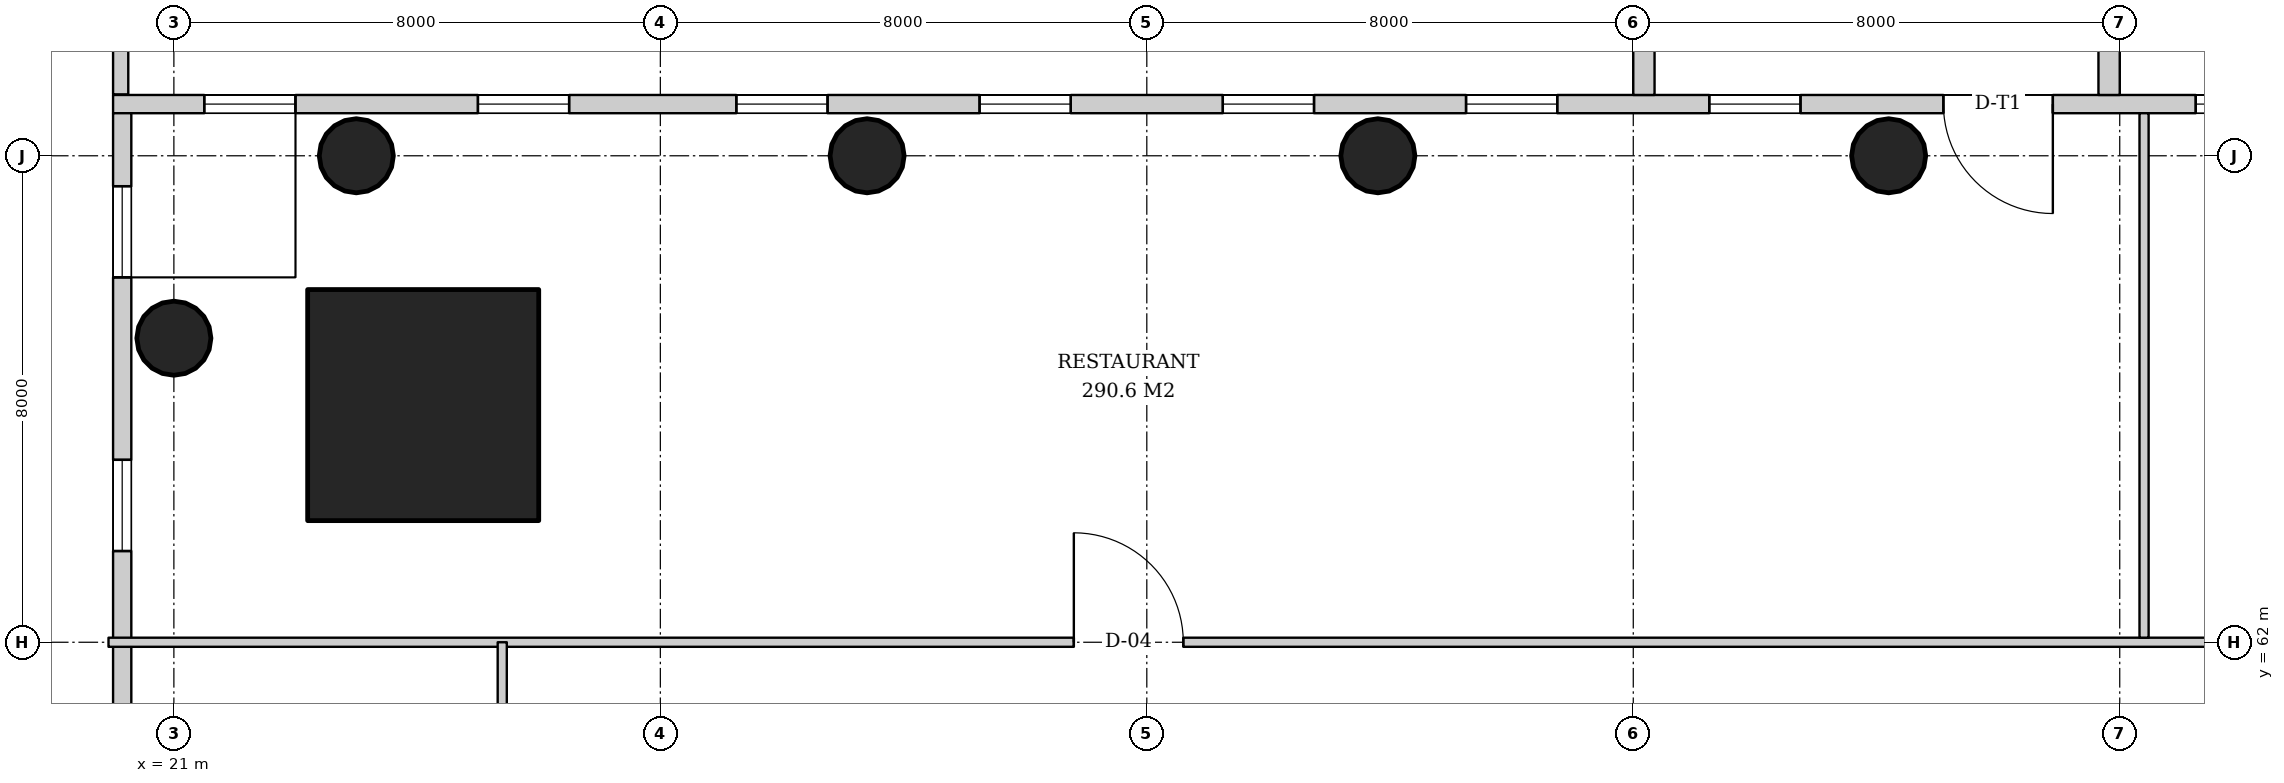
"""IFC4 building model, lengths in metres.
Left out: names, types, materials, properties, quantities, classifications, styles, units other than length and angle.
Written with IfcOpenShell. Run it as: python <this file> out.ifc"""

import sys

from ifc_helpers import new_model, si_unit, direction, frame, frame_2d, origin, origin_2d, place, context, subcontext, project, spatial, rectangle, hollow_circle, extrude, element, fill, save


model = new_model("IFC4")
c1 = context("Model", 3, precision=1e-05, world=origin(), true_north=direction((0.0, 1.0)))
c2 = subcontext(c1, "Body", "Model", "MODEL_VIEW")
j1 = project(units=[si_unit("LENGTHUNIT", "METRE"), si_unit("PLANEANGLEUNIT", "RADIAN")], contexts=[c1])
p1 = place(None, origin())
s1 = spatial("IfcSite", under=j1, at=p1, CompositionType="ELEMENT")
p2 = place(p1, origin())
s2 = spatial("IfcBuilding", under=s1, at=p2, CompositionType="ELEMENT")
p3 = place(p2, frame((0.0, 0.0, 16.0)))
s3 = spatial("IfcBuildingStorey", under=s2, at=p3, CompositionType="ELEMENT", Elevation=16.0)
p4 = place(p3, frame((25.1, 65.9, 0.0), z_axis=(0.0, 0.0, 1.0), x_axis=(1.0, 0.0, 0.0)))
e1 = element("IfcColumn", 1, at=p4, inside=s3, PredefinedType="COLUMN", context=c2, shape_type="SweptSolid", body=[
    extrude(rectangle(XDim=3.8, YDim=3.8, at=origin_2d()), origin(), (0.0, 0.0, 1.0), 5.0),
])
for number, where, z_axis, x_axis in (
    (2, (24.0, 70.0, 0.0), (0.0, 0.0, 1.0), (1.0, 0.0, 0.0)),
    (3, (49.2, 70.0, 0.0), (0.0, 0.0, 1.0), (1.0, 0.0, 0.0)),
    (4, (40.8, 70.0, 0.0), (0.0, 0.0, 1.0), (1.0, 0.0, 0.0)),
    (5, (32.4, 70.0, 0.0), (0.0, 0.0, 1.0), (1.0, 0.0, 0.0)),
    (6, (21.0, 67.0, 0.0), (0.0, 0.0, 1.0), (1.0, 0.0, 0.0)),
):
    element("IfcColumn", number, at=place(p3, frame(where, z_axis=z_axis, x_axis=x_axis)), inside=s3, PredefinedType="COLUMN", context=c2, shape_type="SweptSolid", body=[
        extrude(hollow_circle(Radius=0.61, WallThickness=0.04, at=origin_2d()), origin(), (0.0, 0.0, 1.0), 5.0),
    ])
p5 = place(p3, frame((78.0, 70.85, 0.0), z_axis=(0.0, 0.0, 1.0), x_axis=(-1.0, 0.0, 0.0)))
e7 = element("IfcWall", 7, at=p5, inside=s3, PredefinedType="SOLIDWALL", context=c2, shape_type="SweptSolid", body=[
    extrude(rectangle(XDim=58.0, YDim=0.3, at=frame_2d((29.0, 0.0))), origin(), (0.0, 0.0, 1.0), 4.7),
])
p6 = place(p5, frame((1.5, 0.0, 0.9)))
e8 = element("IfcOpeningElement", 8, at=p6, cuts=e7, PredefinedType="OPENING", context=c2, shape_type="SweptSolid", body=[
    extrude(rectangle(XDim=1.5, YDim=3.2, at=frame_2d((0.75, 1.6))), frame((0.0, 0.16, 0.0), z_axis=(0.0, -1.0, 0.0), x_axis=(1.0, 0.0, 0.0)), (0.0, 0.0, 1.0), 0.32),
])
p7 = place(p5, frame((6.0, 0.0, 0.9)))
e9 = element("IfcOpeningElement", 9, at=p7, cuts=e7, PredefinedType="OPENING", context=c2, shape_type="SweptSolid", body=[
    extrude(rectangle(XDim=1.5, YDim=3.2, at=frame_2d((0.75, 1.6))), frame((0.0, 0.16, 0.0), z_axis=(0.0, -1.0, 0.0), x_axis=(1.0, 0.0, 0.0)), (0.0, 0.0, 1.0), 0.32),
])
p8 = place(p5, frame((10.25, 0.0, 0.9)))
e10 = element("IfcOpeningElement", 10, at=p8, cuts=e7, PredefinedType="OPENING", context=c2, shape_type="SweptSolid", body=[
    extrude(rectangle(XDim=1.5, YDim=3.2, at=frame_2d((0.75, 1.6))), frame((0.0, 0.16, 0.0), z_axis=(0.0, -1.0, 0.0), x_axis=(1.0, 0.0, 0.0)), (0.0, 0.0, 1.0), 0.32),
])
p9 = place(p5, frame((14.25, 0.0, 0.9)))
e11 = element("IfcOpeningElement", 11, at=p9, cuts=e7, PredefinedType="OPENING", context=c2, shape_type="SweptSolid", body=[
    extrude(rectangle(XDim=1.5, YDim=3.2, at=frame_2d((0.75, 1.6))), frame((0.0, 0.16, 0.0), z_axis=(0.0, -1.0, 0.0), x_axis=(1.0, 0.0, 0.0)), (0.0, 0.0, 1.0), 0.32),
])
p10 = place(p5, frame((18.25, 0.0, 0.9)))
e12 = element("IfcOpeningElement", 12, at=p10, cuts=e7, PredefinedType="OPENING", context=c2, shape_type="SweptSolid", body=[
    extrude(rectangle(XDim=1.5, YDim=3.2, at=frame_2d((0.75, 1.6))), frame((0.0, 0.16, 0.0), z_axis=(0.0, -1.0, 0.0), x_axis=(1.0, 0.0, 0.0)), (0.0, 0.0, 1.0), 0.32),
])
p11 = place(p5, frame((22.25, 0.0, 0.9)))
e13 = element("IfcOpeningElement", 13, at=p11, cuts=e7, PredefinedType="OPENING", context=c2, shape_type="SweptSolid", body=[
    extrude(rectangle(XDim=1.5, YDim=3.2, at=frame_2d((0.75, 1.6))), frame((0.0, 0.16, 0.0), z_axis=(0.0, -1.0, 0.0), x_axis=(1.0, 0.0, 0.0)), (0.0, 0.0, 1.0), 0.32),
])
p12 = place(p5, frame((26.1, 0.0, 0.0)))
e14 = element("IfcOpeningElement", 14, at=p12, cuts=e7, PredefinedType="OPENING", context=c2, shape_type="SweptSolid", body=[
    extrude(rectangle(XDim=1.8, YDim=2.4, at=frame_2d((0.9, 1.2))), frame((0.0, 0.16, 0.0), z_axis=(0.0, -1.0, 0.0), x_axis=(1.0, 0.0, 0.0)), (0.0, 0.0, 1.0), 0.32),
])
p13 = place(p5, frame((30.25, 0.0, 0.9)))
e15 = element("IfcOpeningElement", 15, at=p13, cuts=e7, PredefinedType="OPENING", context=c2, shape_type="SweptSolid", body=[
    extrude(rectangle(XDim=1.5, YDim=3.2, at=frame_2d((0.75, 1.6))), frame((0.0, 0.16, 0.0), z_axis=(0.0, -1.0, 0.0), x_axis=(1.0, 0.0, 0.0)), (0.0, 0.0, 1.0), 0.32),
])
p14 = place(p5, frame((34.25, 0.0, 0.9)))
e16 = element("IfcOpeningElement", 16, at=p14, cuts=e7, PredefinedType="OPENING", context=c2, shape_type="SweptSolid", body=[
    extrude(rectangle(XDim=1.5, YDim=3.2, at=frame_2d((0.75, 1.6))), frame((0.0, 0.16, 0.0), z_axis=(0.0, -1.0, 0.0), x_axis=(1.0, 0.0, 0.0)), (0.0, 0.0, 1.0), 0.32),
])
p15 = place(p5, frame((38.25, 0.0, 0.9)))
e17 = element("IfcOpeningElement", 17, at=p15, cuts=e7, PredefinedType="OPENING", context=c2, shape_type="SweptSolid", body=[
    extrude(rectangle(XDim=1.5, YDim=3.2, at=frame_2d((0.75, 1.6))), frame((0.0, 0.16, 0.0), z_axis=(0.0, -1.0, 0.0), x_axis=(1.0, 0.0, 0.0)), (0.0, 0.0, 1.0), 0.32),
])
p16 = place(p5, frame((42.25, 0.0, 0.9)))
e18 = element("IfcOpeningElement", 18, at=p16, cuts=e7, PredefinedType="OPENING", context=c2, shape_type="SweptSolid", body=[
    extrude(rectangle(XDim=1.5, YDim=3.2, at=frame_2d((0.75, 1.6))), frame((0.0, 0.16, 0.0), z_axis=(0.0, -1.0, 0.0), x_axis=(1.0, 0.0, 0.0)), (0.0, 0.0, 1.0), 0.32),
])
p17 = place(p5, frame((46.25, 0.0, 0.9)))
e19 = element("IfcOpeningElement", 19, at=p17, cuts=e7, PredefinedType="OPENING", context=c2, shape_type="SweptSolid", body=[
    extrude(rectangle(XDim=1.5, YDim=3.2, at=frame_2d((0.75, 1.6))), frame((0.0, 0.16, 0.0), z_axis=(0.0, -1.0, 0.0), x_axis=(1.0, 0.0, 0.0)), (0.0, 0.0, 1.0), 0.32),
])
p18 = place(p5, frame((50.5, 0.0, 0.9)))
e20 = element("IfcOpeningElement", 20, at=p18, cuts=e7, PredefinedType="OPENING", context=c2, shape_type="SweptSolid", body=[
    extrude(rectangle(XDim=1.5, YDim=3.2, at=frame_2d((0.75, 1.6))), frame((0.0, 0.16, 0.0), z_axis=(0.0, -1.0, 0.0), x_axis=(1.0, 0.0, 0.0)), (0.0, 0.0, 1.0), 0.32),
])
p19 = place(p5, frame((55.0, 0.0, 0.9)))
e21 = element("IfcOpeningElement", 21, at=p19, cuts=e7, PredefinedType="OPENING", context=c2, shape_type="SweptSolid", body=[
    extrude(rectangle(XDim=1.5, YDim=3.2, at=frame_2d((0.75, 1.6))), frame((0.0, 0.16, 0.0), z_axis=(0.0, -1.0, 0.0), x_axis=(1.0, 0.0, 0.0)), (0.0, 0.0, 1.0), 0.32),
])
p20 = place(p3, frame((20.15, 70.7, 0.0), z_axis=(0.0, 0.0, 1.0), x_axis=(0.0, -1.0, 0.0)))
e22 = element("IfcWall", 22, at=p20, inside=s3, PredefinedType="SOLIDWALL", context=c2, shape_type="SweptSolid", body=[
    extrude(rectangle(XDim=49.4, YDim=0.3, at=frame_2d((24.7, 0.0))), origin(), (0.0, 0.0, 1.0), 4.7),
])
p21 = place(p20, frame((1.2, 0.0, 0.9)))
e23 = element("IfcOpeningElement", 23, at=p21, cuts=e22, PredefinedType="OPENING", context=c2, shape_type="SweptSolid", body=[
    extrude(rectangle(XDim=1.5, YDim=3.2, at=frame_2d((0.75, 1.6))), frame((0.0, 0.16, 0.0), z_axis=(0.0, -1.0, 0.0), x_axis=(1.0, 0.0, 0.0)), (0.0, 0.0, 1.0), 0.32),
])
p22 = place(p20, frame((5.7, 0.0, 0.9)))
e24 = element("IfcOpeningElement", 24, at=p22, cuts=e22, PredefinedType="OPENING", context=c2, shape_type="SweptSolid", body=[
    extrude(rectangle(XDim=1.5, YDim=3.2, at=frame_2d((0.75, 1.6))), frame((0.0, 0.16, 0.0), z_axis=(0.0, -1.0, 0.0), x_axis=(1.0, 0.0, 0.0)), (0.0, 0.0, 1.0), 0.32),
])
p23 = place(p20, frame((9.95, 0.0, 0.9)))
e25 = element("IfcOpeningElement", 25, at=p23, cuts=e22, PredefinedType="OPENING", context=c2, shape_type="SweptSolid", body=[
    extrude(rectangle(XDim=1.5, YDim=3.2, at=frame_2d((0.75, 1.6))), frame((0.0, 0.16, 0.0), z_axis=(0.0, -1.0, 0.0), x_axis=(1.0, 0.0, 0.0)), (0.0, 0.0, 1.0), 0.32),
])
p24 = place(p20, frame((13.95, 0.0, 0.9)))
e26 = element("IfcOpeningElement", 26, at=p24, cuts=e22, PredefinedType="OPENING", context=c2, shape_type="SweptSolid", body=[
    extrude(rectangle(XDim=1.5, YDim=3.2, at=frame_2d((0.75, 1.6))), frame((0.0, 0.16, 0.0), z_axis=(0.0, -1.0, 0.0), x_axis=(1.0, 0.0, 0.0)), (0.0, 0.0, 1.0), 0.32),
])
p25 = place(p20, frame((17.95, 0.0, 0.9)))
e27 = element("IfcOpeningElement", 27, at=p25, cuts=e22, PredefinedType="OPENING", context=c2, shape_type="SweptSolid", body=[
    extrude(rectangle(XDim=1.5, YDim=3.2, at=frame_2d((0.75, 1.6))), frame((0.0, 0.16, 0.0), z_axis=(0.0, -1.0, 0.0), x_axis=(1.0, 0.0, 0.0)), (0.0, 0.0, 1.0), 0.32),
])
p26 = place(p20, frame((21.95, 0.0, 0.9)))
e28 = element("IfcOpeningElement", 28, at=p26, cuts=e22, PredefinedType="OPENING", context=c2, shape_type="SweptSolid", body=[
    extrude(rectangle(XDim=1.5, YDim=3.2, at=frame_2d((0.75, 1.6))), frame((0.0, 0.16, 0.0), z_axis=(0.0, -1.0, 0.0), x_axis=(1.0, 0.0, 0.0)), (0.0, 0.0, 1.0), 0.32),
])
p27 = place(p20, frame((25.95, 0.0, 0.9)))
e29 = element("IfcOpeningElement", 29, at=p27, cuts=e22, PredefinedType="OPENING", context=c2, shape_type="SweptSolid", body=[
    extrude(rectangle(XDim=1.5, YDim=3.2, at=frame_2d((0.75, 1.6))), frame((0.0, 0.16, 0.0), z_axis=(0.0, -1.0, 0.0), x_axis=(1.0, 0.0, 0.0)), (0.0, 0.0, 1.0), 0.32),
])
p28 = place(p20, frame((29.95, 0.0, 0.9)))
e30 = element("IfcOpeningElement", 30, at=p28, cuts=e22, PredefinedType="OPENING", context=c2, shape_type="SweptSolid", body=[
    extrude(rectangle(XDim=1.5, YDim=3.2, at=frame_2d((0.75, 1.6))), frame((0.0, 0.16, 0.0), z_axis=(0.0, -1.0, 0.0), x_axis=(1.0, 0.0, 0.0)), (0.0, 0.0, 1.0), 0.32),
])
p29 = place(p20, frame((33.95, 0.0, 0.9)))
e31 = element("IfcOpeningElement", 31, at=p29, cuts=e22, PredefinedType="OPENING", context=c2, shape_type="SweptSolid", body=[
    extrude(rectangle(XDim=1.5, YDim=3.2, at=frame_2d((0.75, 1.6))), frame((0.0, 0.16, 0.0), z_axis=(0.0, -1.0, 0.0), x_axis=(1.0, 0.0, 0.0)), (0.0, 0.0, 1.0), 0.32),
])
p30 = place(p20, frame((37.95, 0.0, 0.9)))
e32 = element("IfcOpeningElement", 32, at=p30, cuts=e22, PredefinedType="OPENING", context=c2, shape_type="SweptSolid", body=[
    extrude(rectangle(XDim=1.5, YDim=3.2, at=frame_2d((0.75, 1.6))), frame((0.0, 0.16, 0.0), z_axis=(0.0, -1.0, 0.0), x_axis=(1.0, 0.0, 0.0)), (0.0, 0.0, 1.0), 0.32),
])
p31 = place(p20, frame((42.2, 0.0, 0.9)))
e33 = element("IfcOpeningElement", 33, at=p31, cuts=e22, PredefinedType="OPENING", context=c2, shape_type="SweptSolid", body=[
    extrude(rectangle(XDim=1.5, YDim=3.2, at=frame_2d((0.75, 1.6))), frame((0.0, 0.16, 0.0), z_axis=(0.0, -1.0, 0.0), x_axis=(1.0, 0.0, 0.0)), (0.0, 0.0, 1.0), 0.32),
])
p32 = place(p20, frame((46.7, 0.0, 0.9)))
e34 = element("IfcOpeningElement", 34, at=p32, cuts=e22, PredefinedType="OPENING", context=c2, shape_type="SweptSolid", body=[
    extrude(rectangle(XDim=1.5, YDim=3.2, at=frame_2d((0.75, 1.6))), frame((0.0, 0.16, 0.0), z_axis=(0.0, -1.0, 0.0), x_axis=(1.0, 0.0, 0.0)), (0.0, 0.0, 1.0), 0.32),
])
p33 = place(p3, frame((20.125, 71.01, 0.0), z_axis=(0.0, 0.0, 1.0), x_axis=(0.0, 1.0, 0.0)))
e35 = element("IfcWall", 35, at=p33, inside=s3, PredefinedType="PARAPET", context=c2, shape_type="SweptSolid", body=[
    extrude(rectangle(XDim=7.74, YDim=0.25, at=frame_2d((3.87, 0.0))), origin(), (0.0, 0.0, 1.0), 1.1),
])
for number, where, z_axis, x_axis in (
    (36, (45.175, 71.0, 0.0), (0.0, 0.0, 1.0), (0.0, 1.0, 0.0)),
    (37, (52.825, 71.0, 0.0), (0.0, 0.0, 1.0), (0.0, 1.0, 0.0)),
):
    element("IfcWall", number, at=place(p3, frame(where, z_axis=z_axis, x_axis=x_axis)), inside=s3, PredefinedType="PARAPET", context=c2, shape_type="SweptSolid", body=[
        extrude(rectangle(XDim=8.0, YDim=0.35, at=frame_2d((4.0, 0.0))), origin(), (0.0, 0.0, 1.0), 1.1),
    ])
p34 = place(p3, frame((19.925, 62.0, 0.0), z_axis=(0.0, 0.0, 1.0), x_axis=(1.0, 0.0, 0.0)))
e38 = element("IfcWall", 38, at=p34, inside=s3, PredefinedType="PARTITIONING", context=c2, shape_type="SweptSolid", body=[
    extrude(rectangle(XDim=50.15, YDim=0.15, at=frame_2d((25.075, 0.0))), origin(), (0.0, 0.0, 1.0), 3.688),
])
p35 = place(p34, frame((15.875, 0.0, 0.0)))
e39 = element("IfcOpeningElement", 39, at=p35, cuts=e38, PredefinedType="OPENING", context=c2, shape_type="SweptSolid", body=[
    extrude(rectangle(XDim=1.8, YDim=2.4, at=frame_2d((0.9, 1.2))), frame((0.0, 0.085, 0.0), z_axis=(0.0, -1.0, 0.0), x_axis=(1.0, 0.0, 0.0)), (0.0, 0.0, 1.0), 0.17),
])
p36 = place(p34, frame((39.875, 0.0, 0.0)))
e40 = element("IfcOpeningElement", 40, at=p36, cuts=e38, PredefinedType="OPENING", context=c2, shape_type="SweptSolid", body=[
    extrude(rectangle(XDim=1.0, YDim=2.1, at=frame_2d((0.5, 1.05))), frame((0.0, 0.085, 0.0), z_axis=(0.0, -1.0, 0.0), x_axis=(1.0, 0.0, 0.0)), (0.0, 0.0, 1.0), 0.17),
])
p37 = place(p3, frame((53.4, 62.075, 0.0), z_axis=(0.0, 0.0, 1.0), x_axis=(0.0, 1.0, 0.0)))
e41 = element("IfcWall", 41, at=p37, inside=s3, PredefinedType="PARTITIONING", context=c2, shape_type="SweptSolid", body=[
    extrude(rectangle(XDim=8.625, YDim=0.15, at=frame_2d((4.312, 0.0))), origin(), (0.0, 0.0, 1.0), 4.1),
])
p38 = place(p3, frame((26.4, 30.0, 0.0), z_axis=(0.0, 0.0, 1.0), x_axis=(0.0, 1.0, 0.0)))
e42 = element("IfcWall", 42, at=p38, inside=s3, PredefinedType="PARTITIONING", context=c2, shape_type="SweptSolid", body=[
    extrude(rectangle(XDim=32.0, YDim=0.15, at=frame_2d((16.0, 0.0))), origin(), (0.0, 0.0, 1.0), 3.688),
])
p39 = place(p38, frame((7.5, 0.0, 0.0)))
e43 = element("IfcOpeningElement", 43, at=p39, cuts=e42, PredefinedType="OPENING", context=c2, shape_type="SweptSolid", body=[
    extrude(rectangle(XDim=1.0, YDim=2.1, at=frame_2d((0.5, 1.05))), frame((0.0, 0.085, 0.0), z_axis=(0.0, -1.0, 0.0), x_axis=(1.0, 0.0, 0.0)), (0.0, 0.0, 1.0), 0.17),
])
p40 = place(p38, frame((23.5, 0.0, 0.0)))
e44 = element("IfcOpeningElement", 44, at=p40, cuts=e42, PredefinedType="OPENING", context=c2, shape_type="SweptSolid", body=[
    extrude(rectangle(XDim=1.0, YDim=2.1, at=frame_2d((0.5, 1.05))), frame((0.0, 0.085, 0.0), z_axis=(0.0, -1.0, 0.0), x_axis=(1.0, 0.0, 0.0)), (0.0, 0.0, 1.0), 0.17),
])
p41 = place(p11, origin())
e45 = element("IfcWindow", 45, at=p41, inside=s3, PartitioningType="SINGLE_PANEL", PredefinedType="WINDOW", context=c2, shape_type="SweptSolid", body=[
    extrude(rectangle(XDim=1.5, YDim=3.2, at=frame_2d((0.75, 1.6))), frame((0.0, 0.03, 0.0), z_axis=(0.0, -1.0, 0.0), x_axis=(1.0, 0.0, 0.0)), (0.0, 0.0, 1.0), 0.06),
])
fill(e13, e45)
p42 = place(p12, origin())
e46 = element("IfcDoor", 46, at=p42, inside=s3, OperationType="DOUBLE_DOOR_SINGLE_SWING", PredefinedType="DOOR", context=c2, shape_type="SweptSolid", body=[
    extrude(rectangle(XDim=1.8, YDim=2.4, at=frame_2d((0.9, 1.2))), frame((0.0, 0.025, 0.0), z_axis=(0.0, -1.0, 0.0), x_axis=(1.0, 0.0, 0.0)), (0.0, 0.0, 1.0), 0.05),
])
fill(e14, e46)
p43 = place(p13, origin())
e47 = element("IfcWindow", 47, at=p43, inside=s3, PartitioningType="SINGLE_PANEL", PredefinedType="WINDOW", context=c2, shape_type="SweptSolid", body=[
    extrude(rectangle(XDim=1.5, YDim=3.2, at=frame_2d((0.75, 1.6))), frame((0.0, 0.03, 0.0), z_axis=(0.0, -1.0, 0.0), x_axis=(1.0, 0.0, 0.0)), (0.0, 0.0, 1.0), 0.06),
])
fill(e15, e47)
p44 = place(p14, origin())
e48 = element("IfcWindow", 48, at=p44, inside=s3, PartitioningType="SINGLE_PANEL", PredefinedType="WINDOW", context=c2, shape_type="SweptSolid", body=[
    extrude(rectangle(XDim=1.5, YDim=3.2, at=frame_2d((0.75, 1.6))), frame((0.0, 0.03, 0.0), z_axis=(0.0, -1.0, 0.0), x_axis=(1.0, 0.0, 0.0)), (0.0, 0.0, 1.0), 0.06),
])
fill(e16, e48)
p45 = place(p15, origin())
e49 = element("IfcWindow", 49, at=p45, inside=s3, PartitioningType="SINGLE_PANEL", PredefinedType="WINDOW", context=c2, shape_type="SweptSolid", body=[
    extrude(rectangle(XDim=1.5, YDim=3.2, at=frame_2d((0.75, 1.6))), frame((0.0, 0.03, 0.0), z_axis=(0.0, -1.0, 0.0), x_axis=(1.0, 0.0, 0.0)), (0.0, 0.0, 1.0), 0.06),
])
fill(e17, e49)
p46 = place(p16, origin())
e50 = element("IfcWindow", 50, at=p46, inside=s3, PartitioningType="SINGLE_PANEL", PredefinedType="WINDOW", context=c2, shape_type="SweptSolid", body=[
    extrude(rectangle(XDim=1.5, YDim=3.2, at=frame_2d((0.75, 1.6))), frame((0.0, 0.03, 0.0), z_axis=(0.0, -1.0, 0.0), x_axis=(1.0, 0.0, 0.0)), (0.0, 0.0, 1.0), 0.06),
])
fill(e18, e50)
p47 = place(p17, origin())
e51 = element("IfcWindow", 51, at=p47, inside=s3, PartitioningType="SINGLE_PANEL", PredefinedType="WINDOW", context=c2, shape_type="SweptSolid", body=[
    extrude(rectangle(XDim=1.5, YDim=3.2, at=frame_2d((0.75, 1.6))), frame((0.0, 0.03, 0.0), z_axis=(0.0, -1.0, 0.0), x_axis=(1.0, 0.0, 0.0)), (0.0, 0.0, 1.0), 0.06),
])
fill(e19, e51)
p48 = place(p18, origin())
e52 = element("IfcWindow", 52, at=p48, inside=s3, PartitioningType="SINGLE_PANEL", PredefinedType="WINDOW", context=c2, shape_type="SweptSolid", body=[
    extrude(rectangle(XDim=1.5, YDim=3.2, at=frame_2d((0.75, 1.6))), frame((0.0, 0.03, 0.0), z_axis=(0.0, -1.0, 0.0), x_axis=(1.0, 0.0, 0.0)), (0.0, 0.0, 1.0), 0.06),
])
fill(e20, e52)
p49 = place(p19, origin())
e53 = element("IfcWindow", 53, at=p49, inside=s3, PartitioningType="SINGLE_PANEL", PredefinedType="WINDOW", context=c2, shape_type="SweptSolid", body=[
    extrude(rectangle(XDim=1.5, YDim=3.2, at=frame_2d((0.75, 1.6))), frame((0.0, 0.03, 0.0), z_axis=(0.0, -1.0, 0.0), x_axis=(1.0, 0.0, 0.0)), (0.0, 0.0, 1.0), 0.06),
])
fill(e21, e53)
p50 = place(p21, origin())
e54 = element("IfcWindow", 54, at=p50, inside=s3, PartitioningType="SINGLE_PANEL", PredefinedType="WINDOW", context=c2, shape_type="SweptSolid", body=[
    extrude(rectangle(XDim=1.5, YDim=3.2, at=frame_2d((0.75, 1.6))), frame((0.0, 0.03, 0.0), z_axis=(0.0, -1.0, 0.0), x_axis=(1.0, 0.0, 0.0)), (0.0, 0.0, 1.0), 0.06),
])
fill(e23, e54)
p51 = place(p22, origin())
e55 = element("IfcWindow", 55, at=p51, inside=s3, PartitioningType="SINGLE_PANEL", PredefinedType="WINDOW", context=c2, shape_type="SweptSolid", body=[
    extrude(rectangle(XDim=1.5, YDim=3.2, at=frame_2d((0.75, 1.6))), frame((0.0, 0.03, 0.0), z_axis=(0.0, -1.0, 0.0), x_axis=(1.0, 0.0, 0.0)), (0.0, 0.0, 1.0), 0.06),
])
fill(e24, e55)
p52 = place(p35, origin())
e56 = element("IfcDoor", 56, at=p52, inside=s3, OperationType="DOUBLE_DOOR_SINGLE_SWING", PredefinedType="DOOR", context=c2, shape_type="SweptSolid", body=[
    extrude(rectangle(XDim=1.8, YDim=2.4, at=frame_2d((0.9, 1.2))), frame((0.0, 0.025, 0.0), z_axis=(0.0, -1.0, 0.0), x_axis=(1.0, 0.0, 0.0)), (0.0, 0.0, 1.0), 0.05),
])
fill(e39, e56)
save(model, sys.argv[1])
